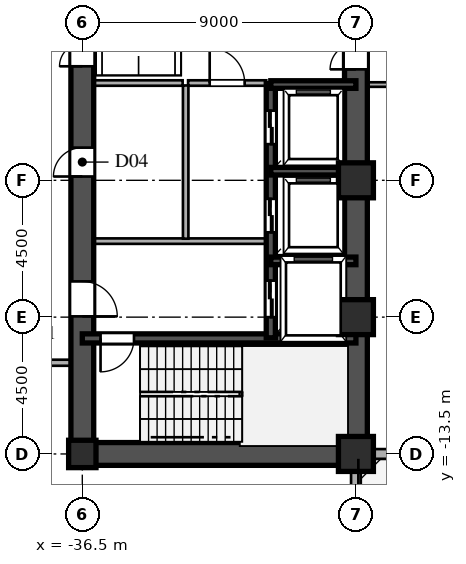
"""IFC4 building model, lengths in metres.
Left out: names, types, materials, properties, quantities, classifications, styles, units other than length and angle.
Written with IfcOpenShell. Run it as: python <this file> out.ifc"""

import sys

from ifc_helpers import new_model, si_unit, direction, frame, frame_2d, origin, origin_2d, place, context, subcontext, project, spatial, rectangle, hollow_rectangle, i_section, extrude, source, transform, mapped, element, fill, save


model = new_model("IFC4")
c1 = context("Model", 3, precision=1e-05, world=origin(), true_north=direction((0.0, 1.0)))
c2 = subcontext(c1, "Body", "Model", "MODEL_VIEW")
j1 = project(units=[si_unit("LENGTHUNIT", "METRE"), si_unit("PLANEANGLEUNIT", "RADIAN")], contexts=[c1])
p1 = place(None, origin())
s1 = spatial("IfcSite", under=j1, at=p1, CompositionType="ELEMENT")
p2 = place(p1, origin())
s2 = spatial("IfcBuilding", under=s1, at=p2, CompositionType="ELEMENT")
p3 = place(p2, frame((0.0, 0.0, 14.4)))
s3 = spatial("IfcBuildingStorey", under=s2, at=p3, CompositionType="ELEMENT", Elevation=14.4)
m1 = source(origin(), c2, "Body", "SweptSolid", [
    extrude(hollow_rectangle(XDim=1.15, YDim=1.15, WallThickness=0.048, at=origin_2d()), origin(), (0.0, 0.0, 1.0), 4.5),
])
for number, where, z_axis, x_axis in (
    (1, (-27.5, -13.5, 0.0), (0.0, 0.0, 1.0), (1.0, 0.0, 0.0)),
    (2, (-27.5, -9.0, 0.0), (0.0, 0.0, 1.0), (1.0, 0.0, 0.0)),
    (3, (-27.5, -4.5, 0.0), (0.0, 0.0, 1.0), (1.0, 0.0, 0.0)),
):
    element("IfcColumn", number, at=place(p3, frame(where, z_axis=z_axis, x_axis=x_axis)), inside=s3, PredefinedType="COLUMN", context=c2, shape_type="MappedRepresentation", body=[
        mapped(m1, transform((0.0, 0.0, 0.0), scale=1.0)),
    ])
m2 = source(origin(), c2, "Body", "SweptSolid", [
    extrude(i_section(OverallWidth=0.9, OverallDepth=0.9, WebThickness=0.036, FlangeThickness=0.055, at=origin_2d()), origin(), (0.0, 0.0, 1.0), 4.5),
])
p4 = place(p3, frame((-36.5, -13.5, 0.0), z_axis=(0.0, 0.0, 1.0), x_axis=(1.0, 0.0, 0.0)))
e4 = element("IfcColumn", 4, at=p4, inside=s3, PredefinedType="COLUMN", context=c2, shape_type="MappedRepresentation", body=[
    mapped(m2, transform((0.0, 0.0, 0.0), scale=1.0)),
])
p5 = place(p3, frame((-72.463, -10.015, 0.0), z_axis=(0.0, 0.0, 1.0), x_axis=(0.926944846568, -0.375197616492, 0.0)))
e5 = element("IfcWall", 5, at=p5, inside=s3, PredefinedType="SOLIDWALL", context=c2, shape_type="SweptSolid", body=[
    extrude(rectangle(XDim=45.23, YDim=0.32, at=frame_2d((22.615, 0.0))), origin(), (0.0, 0.0, 1.0), 4.28),
])
p6 = place(p5, frame((6.0, 0.0, 0.85)))
e6 = element("IfcOpeningElement", 6, at=p6, cuts=e5, PredefinedType="OPENING", context=c2, shape_type="SweptSolid", body=[
    extrude(rectangle(XDim=1.8, YDim=2.0, at=frame_2d((0.9, 1.0))), frame((0.0, 0.17, 0.0), z_axis=(0.0, -1.0, 0.0), x_axis=(1.0, 0.0, 0.0)), (0.0, 0.0, 1.0), 0.34),
])
p7 = place(p5, frame((36.23, 0.0, 0.85)))
e7 = element("IfcOpeningElement", 7, at=p7, cuts=e5, PredefinedType="OPENING", context=c2, shape_type="SweptSolid", body=[
    extrude(rectangle(XDim=1.8, YDim=2.0, at=frame_2d((0.9, 1.0))), frame((0.0, 0.17, 0.0), z_axis=(0.0, -1.0, 0.0), x_axis=(1.0, 0.0, 0.0)), (0.0, 0.0, 1.0), 0.34),
])
p8 = place(p3, frame((-27.5, -23.95, 0.0), z_axis=(0.0, 0.0, 1.0), x_axis=(0.0, 1.0, 0.0)))
e8 = element("IfcWall", 8, at=p8, inside=s3, PredefinedType="SOLIDWALL", context=c2, shape_type="SweptSolid", body=[
    extrude(rectangle(XDim=10.4, YDim=0.32, at=frame_2d((5.2, 0.0))), origin(), (0.0, 0.0, 1.0), 2.78),
])
p9 = place(p3, frame((-27.46, -13.5, 0.0), z_axis=(0.0, 0.0, 1.0), x_axis=(1.0, 0.0, 0.0)))
e9 = element("IfcWall", 9, at=p9, inside=s3, PredefinedType="SOLIDWALL", context=c2, shape_type="SweptSolid", body=[
    extrude(rectangle(XDim=54.92, YDim=0.32, at=frame_2d((27.46, 0.0))), origin(), (0.0, 0.0, 1.0), 4.28),
])
p10 = place(p9, frame((15.8, 0.0, 0.0)))
e10 = element("IfcOpeningElement", 10, at=p10, cuts=e9, PredefinedType="OPENING", context=c2, shape_type="SweptSolid", body=[
    extrude(rectangle(XDim=1.8, YDim=2.3, at=frame_2d((0.9, 1.15))), frame((0.0, 0.17, 0.0), z_axis=(0.0, -1.0, 0.0), x_axis=(1.0, 0.0, 0.0)), (0.0, 0.0, 1.0), 0.34),
])
p11 = place(p9, frame((18.8, 0.0, 0.0)))
e11 = element("IfcOpeningElement", 11, at=p11, cuts=e9, PredefinedType="OPENING", context=c2, shape_type="SweptSolid", body=[
    extrude(rectangle(XDim=1.8, YDim=2.3, at=frame_2d((0.9, 1.15))), frame((0.0, 0.17, 0.0), z_axis=(0.0, -1.0, 0.0), x_axis=(1.0, 0.0, 0.0)), (0.0, 0.0, 1.0), 0.34),
])
p12 = place(p9, frame((4.5, 0.0, 0.8)))
e12 = element("IfcOpeningElement", 12, at=p12, cuts=e9, PredefinedType="OPENING", context=c2, shape_type="SweptSolid", body=[
    extrude(rectangle(XDim=1.65, YDim=1.85, at=frame_2d((0.825, 0.925))), frame((0.0, 0.17, 0.0), z_axis=(0.0, -1.0, 0.0), x_axis=(1.0, 0.0, 0.0)), (0.0, 0.0, 1.0), 0.34),
])
p13 = place(p9, frame((25.0, 0.0, 0.8)))
e13 = element("IfcOpeningElement", 13, at=p13, cuts=e9, PredefinedType="OPENING", context=c2, shape_type="SweptSolid", body=[
    extrude(rectangle(XDim=1.65, YDim=1.85, at=frame_2d((0.825, 0.925))), frame((0.0, 0.17, 0.0), z_axis=(0.0, -1.0, 0.0), x_axis=(1.0, 0.0, 0.0)), (0.0, 0.0, 1.0), 0.34),
])
p14 = place(p9, frame((46.42, 0.0, 0.8)))
e14 = element("IfcOpeningElement", 14, at=p14, cuts=e9, PredefinedType="OPENING", context=c2, shape_type="SweptSolid", body=[
    extrude(rectangle(XDim=1.65, YDim=1.85, at=frame_2d((0.825, 0.925))), frame((0.0, 0.17, 0.0), z_axis=(0.0, -1.0, 0.0), x_axis=(1.0, 0.0, 0.0)), (0.0, 0.0, 1.0), 0.34),
])
p15 = place(p3, frame((-27.5, -13.5, 0.0), z_axis=(0.0, 0.0, 1.0), x_axis=(0.0, 1.0, 0.0)))
e15 = element("IfcWall", 15, at=p15, inside=s3, PredefinedType="SHEAR", context=c2, shape_type="SweptSolid", body=[
    extrude(rectangle(XDim=12.2, YDim=0.75, at=frame_2d((6.1, 0.0))), origin(), (0.0, 0.0, 1.0), 4.28),
])
p16 = place(p3, frame((-27.5, -1.3, 0.0), z_axis=(0.0, 0.0, 1.0), x_axis=(0.0, 1.0, 0.0)))
e16 = element("IfcWall", 16, at=p16, inside=s3, PredefinedType="SHEAR", context=c2, shape_type="SweptSolid", body=[
    extrude(rectangle(XDim=2.6, YDim=0.75, at=frame_2d((1.3, 0.0))), origin(), (0.0, 0.0, 1.0), 4.28),
])
p17 = place(p16, frame((0.45, 0.0, 0.0)))
e17 = element("IfcOpeningElement", 17, at=p17, cuts=e16, PredefinedType="OPENING", context=c2, shape_type="SweptSolid", body=[
    extrude(rectangle(XDim=1.7, YDim=2.35, at=frame_2d((0.85, 1.175))), frame((0.0, 0.385, 0.0), z_axis=(0.0, -1.0, 0.0), x_axis=(1.0, 0.0, 0.0)), (0.0, 0.0, 1.0), 0.77),
])
p18 = place(p3, frame((-36.5, -13.5, 0.0), z_axis=(0.0, 0.0, 1.0), x_axis=(1.0, 0.0, 0.0)))
e18 = element("IfcWall", 18, at=p18, inside=s3, PredefinedType="SHEAR", context=c2, shape_type="SweptSolid", body=[
    extrude(rectangle(XDim=9.0, YDim=0.75, at=frame_2d((4.5, 0.0))), origin(), (0.0, 0.0, 1.0), 4.28),
])
p19 = place(p3, frame((-36.5, -13.65, 0.0), z_axis=(0.0, 0.0, 1.0), x_axis=(0.0, 1.0, 0.0)))
e19 = element("IfcWall", 19, at=p19, inside=s3, PredefinedType="SHEAR", context=c2, shape_type="SweptSolid", body=[
    extrude(rectangle(XDim=7.15, YDim=0.75, at=frame_2d((3.575, 0.0))), origin(), (0.0, 0.0, 1.0), 4.28),
])
p20 = place(p19, frame((4.675, 0.0, 0.0)))
e20 = element("IfcOpeningElement", 20, at=p20, cuts=e19, PredefinedType="OPENING", context=c2, shape_type="SweptSolid", body=[
    extrude(rectangle(XDim=1.15, YDim=2.2, at=frame_2d((0.575, 1.1))), frame((0.0, 0.385, 0.0), z_axis=(0.0, -1.0, 0.0), x_axis=(1.0, 0.0, 0.0)), (0.0, 0.0, 1.0), 0.77),
])
p21 = place(p3, frame((-36.5, -1.3, 0.0), z_axis=(0.0, 0.0, 1.0), x_axis=(0.0, 1.0, 0.0)))
e21 = element("IfcWall", 21, at=p21, inside=s3, PredefinedType="SHEAR", context=c2, shape_type="SweptSolid", body=[
    extrude(rectangle(XDim=2.6, YDim=0.75, at=frame_2d((1.3, 0.0))), origin(), (0.0, 0.0, 1.0), 4.28),
])
p22 = place(p21, frame((0.55, 0.0, 0.0)))
e22 = element("IfcOpeningElement", 22, at=p22, cuts=e21, PredefinedType="OPENING", context=c2, shape_type="SweptSolid", body=[
    extrude(rectangle(XDim=1.5, YDim=2.3, at=frame_2d((0.75, 1.15))), frame((0.0, 0.385, 0.0), z_axis=(0.0, -1.0, 0.0), x_axis=(1.0, 0.0, 0.0)), (0.0, 0.0, 1.0), 0.77),
])
p23 = place(p3, frame((-36.5, -6.5, 0.0), z_axis=(0.0, 0.0, 1.0), x_axis=(0.0, 1.0, 0.0)))
e23 = element("IfcWall", 23, at=p23, inside=s3, PredefinedType="SHEAR", context=c2, shape_type="SweptSolid", body=[
    extrude(rectangle(XDim=5.2, YDim=0.75, at=frame_2d((2.6, 0.0))), origin(), (0.0, 0.0, 1.0), 4.28),
])
p24 = place(p23, frame((2.125, 0.0, 0.0)))
e24 = element("IfcOpeningElement", 24, at=p24, cuts=e23, PredefinedType="OPENING", context=c2, shape_type="SweptSolid", body=[
    extrude(rectangle(XDim=0.95, YDim=2.15, at=frame_2d((0.475, 1.075))), frame((0.0, 0.385, 0.0), z_axis=(0.0, -1.0, 0.0), x_axis=(1.0, 0.0, 0.0)), (0.0, 0.0, 1.0), 0.77),
])
p25 = place(p3, frame((-36.5, -9.7, 0.0), z_axis=(0.0, 0.0, 1.0), x_axis=(1.0, 0.0, 0.0)))
e25 = element("IfcWall", 25, at=p25, inside=s3, PredefinedType="SHEAR", context=c2, shape_type="SweptSolid", body=[
    extrude(rectangle(XDim=9.0, YDim=0.3, at=frame_2d((4.5, 0.0))), origin(), (0.0, 0.0, 1.0), 4.28),
])
p26 = place(p25, frame((0.6, 0.0, 0.0)))
e26 = element("IfcOpeningElement", 26, at=p26, cuts=e25, PredefinedType="OPENING", context=c2, shape_type="SweptSolid", body=[
    extrude(rectangle(XDim=1.1, YDim=2.2, at=frame_2d((0.55, 1.1))), frame((0.0, 0.16, 0.0), z_axis=(0.0, -1.0, 0.0), x_axis=(1.0, 0.0, 0.0)), (0.0, 0.0, 1.0), 0.32),
])
for number, where, z_axis, x_axis in (
    (27, (-30.3, -7.15, 0.0), (0.0, 0.0, 1.0), (1.0, 0.0, 0.0)),
    (28, (-30.3, -4.2, 0.0), (0.0, 0.0, 1.0), (1.0, 0.0, 0.0)),
    (29, (-30.3, -1.35, 0.0), (0.0, 0.0, 1.0), (1.0, 0.0, 0.0)),
):
    element("IfcWall", number, at=place(p3, frame(where, z_axis=z_axis, x_axis=x_axis)), inside=s3, PredefinedType="SHEAR", context=c2, shape_type="SweptSolid", body=[
        extrude(rectangle(XDim=2.8, YDim=0.25, at=frame_2d((1.4, 0.0))), origin(), (0.0, 0.0, 1.0), 4.28),
    ])
p27 = place(p3, frame((-30.3, -9.68, 0.0), z_axis=(0.0, 0.0, 1.0), x_axis=(0.0, 1.0, 0.0)))
e30 = element("IfcWall", 30, at=p27, inside=s3, PredefinedType="SHEAR", context=c2, shape_type="SweptSolid", body=[
    extrude(rectangle(XDim=2.56, YDim=0.3, at=frame_2d((1.28, 0.0))), origin(), (0.0, 0.0, 1.0), 4.28),
])
p28 = place(p27, frame((0.68, 0.0, 0.0)))
e31 = element("IfcOpeningElement", 31, at=p28, cuts=e30, PredefinedType="OPENING", context=c2, shape_type="SweptSolid", body=[
    extrude(rectangle(XDim=1.2, YDim=2.25, at=frame_2d((0.6, 1.125))), frame((0.0, 0.16, 0.0), z_axis=(0.0, -1.0, 0.0), x_axis=(1.0, 0.0, 0.0)), (0.0, 0.0, 1.0), 0.32),
])
p29 = place(p3, frame((-30.3, -7.12, 0.0), z_axis=(0.0, 0.0, 1.0), x_axis=(0.0, 1.0, 0.0)))
e32 = element("IfcWall", 32, at=p29, inside=s3, PredefinedType="SHEAR", context=c2, shape_type="SweptSolid", body=[
    extrude(rectangle(XDim=2.92, YDim=0.3, at=frame_2d((1.46, 0.0))), origin(), (0.0, 0.0, 1.0), 4.28),
])
p30 = place(p29, frame((0.91, 0.0, 0.0)))
e33 = element("IfcOpeningElement", 33, at=p30, cuts=e32, PredefinedType="OPENING", context=c2, shape_type="SweptSolid", body=[
    extrude(rectangle(XDim=1.1, YDim=2.2, at=frame_2d((0.55, 1.1))), frame((0.0, 0.16, 0.0), z_axis=(0.0, -1.0, 0.0), x_axis=(1.0, 0.0, 0.0)), (0.0, 0.0, 1.0), 0.32),
])
p31 = place(p3, frame((-30.3, -4.2, 0.0), z_axis=(0.0, 0.0, 1.0), x_axis=(0.0, 1.0, 0.0)))
e34 = element("IfcWall", 34, at=p31, inside=s3, PredefinedType="SHEAR", context=c2, shape_type="SweptSolid", body=[
    extrude(rectangle(XDim=2.88, YDim=0.3, at=frame_2d((1.44, 0.0))), origin(), (0.0, 0.0, 1.0), 4.28),
])
p32 = place(p31, frame((0.89, 0.0, 0.0)))
e35 = element("IfcOpeningElement", 35, at=p32, cuts=e34, PredefinedType="OPENING", context=c2, shape_type="SweptSolid", body=[
    extrude(rectangle(XDim=1.1, YDim=2.2, at=frame_2d((0.55, 1.1))), frame((0.0, 0.16, 0.0), z_axis=(0.0, -1.0, 0.0), x_axis=(1.0, 0.0, 0.0)), (0.0, 0.0, 1.0), 0.32),
])
p33 = place(p3, frame((-36.15, -6.5, 0.0), z_axis=(0.0, 0.0, 1.0), x_axis=(1.0, 0.0, 0.0)))
e36 = element("IfcWall", 36, at=p33, inside=s3, PredefinedType="PARTITIONING", context=c2, shape_type="SweptSolid", body=[
    extrude(rectangle(XDim=5.7, YDim=0.18, at=frame_2d((2.85, 0.0))), origin(), (0.0, 0.0, 1.0), 4.28),
])
p34 = place(p3, frame((-33.1, -6.42, 0.0), z_axis=(0.0, 0.0, 1.0), x_axis=(0.0, 1.0, 0.0)))
e37 = element("IfcWall", 37, at=p34, inside=s3, PredefinedType="PARTITIONING", context=c2, shape_type="SweptSolid", body=[
    extrude(rectangle(XDim=5.04, YDim=0.18, at=frame_2d((2.52, 0.0))), origin(), (0.0, 0.0, 1.0), 4.28),
])
p35 = place(p3, frame((-33.02, -1.3, 0.0), z_axis=(0.0, 0.0, 1.0), x_axis=(1.0, 0.0, 0.0)))
e38 = element("IfcWall", 38, at=p35, inside=s3, PredefinedType="PARTITIONING", context=c2, shape_type="SweptSolid", body=[
    extrude(rectangle(XDim=2.57, YDim=0.18, at=frame_2d((1.285, 0.0))), origin(), (0.0, 0.0, 1.0), 4.28),
])
p36 = place(p35, frame((0.71, 0.0, 0.0)))
e39 = element("IfcOpeningElement", 39, at=p36, cuts=e38, PredefinedType="OPENING", context=c2, shape_type="SweptSolid", body=[
    extrude(rectangle(XDim=1.15, YDim=2.2, at=frame_2d((0.575, 1.1))), frame((0.0, 0.1, 0.0), z_axis=(0.0, -1.0, 0.0), x_axis=(1.0, 0.0, 0.0)), (0.0, 0.0, 1.0), 0.2),
])
p37 = place(p3, frame((-36.15, -1.3, 0.0), z_axis=(0.0, 0.0, 1.0), x_axis=(1.0, 0.0, 0.0)))
e40 = element("IfcWall", 40, at=p37, inside=s3, PredefinedType="PARTITIONING", context=c2, shape_type="SweptSolid", body=[
    extrude(rectangle(XDim=2.95, YDim=0.18, at=frame_2d((1.475, 0.0))), origin(), (0.0, 0.0, 1.0), 4.28),
])
p38 = place(p3, frame((-38.915, -10.5, 0.0), z_axis=(0.0, 0.0, 1.0), x_axis=(1.0, 0.0, 0.0)))
e41 = element("IfcWall", 41, at=p38, inside=s3, PredefinedType="PARTITIONING", context=c2, shape_type="SweptSolid", body=[
    extrude(rectangle(XDim=2.035, YDim=0.2, at=frame_2d((1.018, 0.0))), origin(), (0.0, 0.0, 1.0), 4.28),
])
p39 = place(p3, frame((-27.12, -1.35, 0.0), z_axis=(0.0, 0.0, 1.0), x_axis=(1.0, 0.0, 0.0)))
e42 = element("IfcWall", 42, at=p39, inside=s3, PredefinedType="PARTITIONING", context=c2, shape_type="SweptSolid", body=[
    extrude(rectangle(XDim=14.835, YDim=0.15, at=frame_2d((7.417, 0.0))), origin(), (0.0, 0.0, 1.0), 4.28),
])
m3 = source(origin(), c2, "Body", "SweptSolid", [
    extrude(rectangle(XDim=1.7, YDim=2.35, at=frame_2d((0.85, 1.175))), frame((0.0, 0.025, 0.0), z_axis=(0.0, -1.0, 0.0), x_axis=(1.0, 0.0, 0.0)), (0.0, 0.0, 1.0), 0.05),
])
p40 = place(p17, origin())
e43 = element("IfcDoor", 43, at=p40, inside=s3, OperationType="DOUBLE_SWING_LEFT", PredefinedType="DOOR", context=c2, shape_type="MappedRepresentation", body=[
    mapped(m3, transform((0.0, 0.0, 0.0), scale=1.0)),
])
fill(e17, e43)
m4 = source(origin(), c2, "Body", "SweptSolid", [
    extrude(rectangle(XDim=1.15, YDim=2.2, at=frame_2d((0.575, 1.1))), frame((0.0, 0.025, 0.0), z_axis=(0.0, -1.0, 0.0), x_axis=(1.0, 0.0, 0.0)), (0.0, 0.0, 1.0), 0.05),
])
p41 = place(p20, frame((1.15, 0.0, 0.0), z_axis=(0.0, 0.0, 1.0), x_axis=(-1.0, 0.0, 0.0)))
e44 = element("IfcDoor", 44, at=p41, inside=s3, OperationType="SINGLE_SWING_LEFT", PredefinedType="DOOR", context=c2, shape_type="MappedRepresentation", body=[
    mapped(m4, transform((0.0, 0.0, 0.0), scale=1.0)),
])
fill(e20, e44)
m5 = source(origin(), c2, "Body", "SweptSolid", [
    extrude(rectangle(XDim=1.5, YDim=2.3, at=frame_2d((0.75, 1.15))), frame((0.0, 0.025, 0.0), z_axis=(0.0, -1.0, 0.0), x_axis=(1.0, 0.0, 0.0)), (0.0, 0.0, 1.0), 0.05),
])
p42 = place(p22, origin())
e45 = element("IfcDoor", 45, at=p42, inside=s3, OperationType="DOUBLE_SWING_LEFT", PredefinedType="DOOR", context=c2, shape_type="MappedRepresentation", body=[
    mapped(m5, transform((0.0, 0.0, 0.0), scale=1.0)),
])
fill(e22, e45)
m6 = source(origin(), c2, "Body", "SweptSolid", [
    extrude(rectangle(XDim=0.95, YDim=2.15, at=frame_2d((0.475, 1.075))), frame((0.0, 0.025, 0.0), z_axis=(0.0, -1.0, 0.0), x_axis=(1.0, 0.0, 0.0)), (0.0, 0.0, 1.0), 0.05),
])
p43 = place(p24, origin())
e46 = element("IfcDoor", 46, at=p43, inside=s3, OperationType="SINGLE_SWING_LEFT", PredefinedType="DOOR", context=c2, shape_type="MappedRepresentation", body=[
    mapped(m6, transform((0.0, 0.0, 0.0), scale=1.0)),
])
fill(e24, e46)
m7 = source(origin(), c2, "Body", "SweptSolid", [
    extrude(rectangle(XDim=1.1, YDim=2.2, at=frame_2d((0.55, 1.1))), frame((0.0, 0.025, 0.0), z_axis=(0.0, -1.0, 0.0), x_axis=(1.0, 0.0, 0.0)), (0.0, 0.0, 1.0), 0.05),
])
p44 = place(p26, frame((1.1, 0.0, 0.0), z_axis=(0.0, 0.0, 1.0), x_axis=(-1.0, 0.0, 0.0)))
e47 = element("IfcDoor", 47, at=p44, inside=s3, OperationType="SINGLE_SWING_LEFT", PredefinedType="DOOR", context=c2, shape_type="MappedRepresentation", body=[
    mapped(m7, transform((0.0, 0.0, 0.0), scale=1.0)),
])
fill(e26, e47)
m8 = source(origin(), c2, "Body", "SweptSolid", [
    extrude(rectangle(XDim=1.2, YDim=2.25, at=frame_2d((0.6, 1.125))), frame((0.0, 0.025, 0.0), z_axis=(0.0, -1.0, 0.0), x_axis=(1.0, 0.0, 0.0)), (0.0, 0.0, 1.0), 0.05),
])
p45 = place(p28, origin())
e48 = element("IfcDoor", 48, at=p45, inside=s3, OperationType="DOUBLE_DOOR_SLIDING", PredefinedType="DOOR", context=c2, shape_type="MappedRepresentation", body=[
    mapped(m8, transform((0.0, 0.0, 0.0), scale=1.0)),
])
fill(e31, e48)
m9 = source(origin(), c2, "Body", "SweptSolid", [
    extrude(rectangle(XDim=1.1, YDim=2.2, at=frame_2d((0.55, 1.1))), frame((0.0, 0.025, 0.0), z_axis=(0.0, -1.0, 0.0), x_axis=(1.0, 0.0, 0.0)), (0.0, 0.0, 1.0), 0.05),
])
p46 = place(p30, origin())
e49 = element("IfcDoor", 49, at=p46, inside=s3, OperationType="DOUBLE_DOOR_SLIDING", PredefinedType="DOOR", context=c2, shape_type="MappedRepresentation", body=[
    mapped(m9, transform((0.0, 0.0, 0.0), scale=1.0)),
])
fill(e33, e49)
p47 = place(p32, origin())
e50 = element("IfcDoor", 50, at=p47, inside=s3, OperationType="DOUBLE_DOOR_SLIDING", PredefinedType="DOOR", context=c2, shape_type="MappedRepresentation", body=[
    mapped(m9, transform((0.0, 0.0, 0.0), scale=1.0)),
])
fill(e35, e50)
p48 = place(p36, origin())
e51 = element("IfcDoor", 51, at=p48, inside=s3, OperationType="SINGLE_SWING_LEFT", PredefinedType="DOOR", context=c2, shape_type="MappedRepresentation", body=[
    mapped(m4, transform((0.0, 0.0, 0.0), scale=1.0)),
])
fill(e39, e51)
save(model, sys.argv[1])
